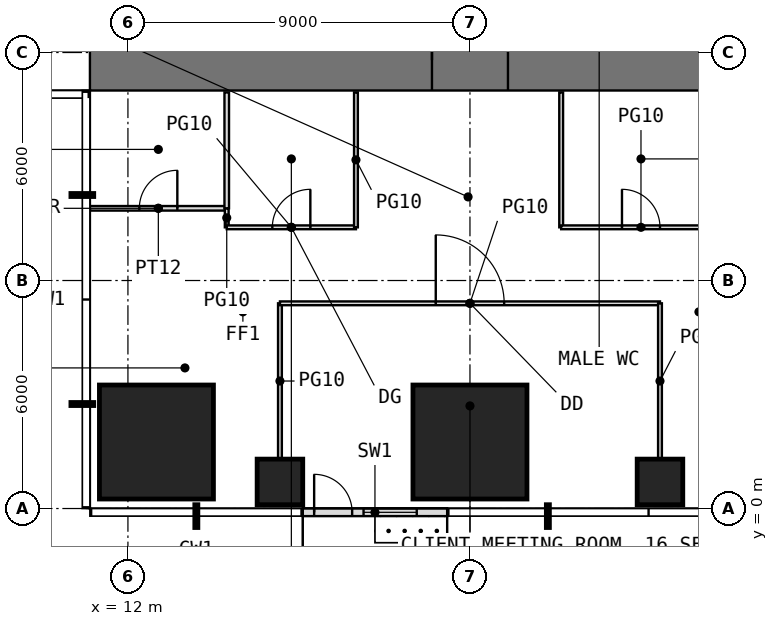
"""IFC4 building model, lengths in metres.
Left out: names, types, materials, properties, quantities, classifications, styles, units other than length and angle.
Written with IfcOpenShell. Run it as: python <this file> out.ifc"""

import sys

from ifc_helpers import new_model, si_unit, direction, frame, frame_2d, origin, origin_2d, place, context, subcontext, project, spatial, rectangle, extrude, element, fill, save


model = new_model("IFC4")
c1 = context("Model", 3, precision=1e-05, world=origin(), true_north=direction((0.0, 1.0)))
c2 = subcontext(c1, "Body", "Model", "MODEL_VIEW")
j1 = project(units=[si_unit("LENGTHUNIT", "METRE"), si_unit("PLANEANGLEUNIT", "RADIAN")], contexts=[c1])
p1 = place(None, origin())
s1 = spatial("IfcSite", under=j1, at=p1, CompositionType="ELEMENT")
p2 = place(p1, origin())
s2 = spatial("IfcBuilding", under=s1, at=p2, CompositionType="ELEMENT")
p3 = place(p2, frame((0.0, 0.0, 100.5)))
s3 = spatial("IfcBuildingStorey", under=s2, at=p3, CompositionType="ELEMENT", Elevation=100.5)
p4 = place(p3, frame((12.75, 1.75, 0.0), z_axis=(0.0, 0.0, 1.0), x_axis=(1.0, 0.0, 0.0)))
e1 = element("IfcColumn", 1, at=p4, inside=s3, PredefinedType="COLUMN", context=c2, shape_type="SweptSolid", body=[
    extrude(rectangle(XDim=3.0, YDim=3.0, at=origin_2d()), origin(), (0.0, 0.0, 1.0), 4.0),
])
p5 = place(p3, frame((16.0, 0.7, 0.0), z_axis=(0.0, 0.0, 1.0), x_axis=(1.0, 0.0, 0.0)))
e2 = element("IfcColumn", 2, at=p5, inside=s3, PredefinedType="COLUMN", context=c2, shape_type="SweptSolid", body=[
    extrude(rectangle(XDim=1.2, YDim=1.2, at=origin_2d()), origin(), (0.0, 0.0, 1.0), 4.0),
])
p6 = place(p3, frame((21.0, 1.75, 0.0), z_axis=(0.0, 0.0, 1.0), x_axis=(1.0, 0.0, 0.0)))
e3 = element("IfcColumn", 3, at=p6, inside=s3, PredefinedType="COLUMN", context=c2, shape_type="SweptSolid", body=[
    extrude(rectangle(XDim=3.0, YDim=3.0, at=origin_2d()), origin(), (0.0, 0.0, 1.0), 4.0),
])
p7 = place(p3, frame((26.0, 0.7, 0.0), z_axis=(0.0, 0.0, 1.0), x_axis=(1.0, 0.0, 0.0)))
e4 = element("IfcColumn", 4, at=p7, inside=s3, PredefinedType="COLUMN", context=c2, shape_type="SweptSolid", body=[
    extrude(rectangle(XDim=1.2, YDim=1.2, at=origin_2d()), origin(), (0.0, 0.0, 1.0), 4.0),
])
p8 = place(p3, frame((16.6, -0.1, 0.0), z_axis=(0.0, 0.0, 1.0), x_axis=(1.0, 0.0, 0.0)))
e5 = element("IfcWall", 5, at=p8, inside=s3, PredefinedType="USERDEFINED", context=c2, shape_type="SweptSolid", body=[
    extrude(rectangle(XDim=3.8, YDim=0.2, at=frame_2d((1.9, 0.0))), origin(), (0.0, 0.0, 1.0), 3.75),
])
p9 = place(p8, frame((0.3, 0.0, 0.0)))
e6 = element("IfcOpeningElement", 6, at=p9, cuts=e5, PredefinedType="OPENING", context=c2, shape_type="SweptSolid", body=[
    extrude(rectangle(XDim=1.0, YDim=2.4, at=frame_2d((0.5, 1.2))), frame((0.0, 0.11, 0.0), z_axis=(0.0, -1.0, 0.0), x_axis=(1.0, 0.0, 0.0)), (0.0, 0.0, 1.0), 0.22),
])
p10 = place(p8, frame((1.6, 0.0, 0.3)))
e7 = element("IfcOpeningElement", 7, at=p10, cuts=e5, PredefinedType="OPENING", context=c2, shape_type="SweptSolid", body=[
    extrude(rectangle(XDim=1.4, YDim=2.7, at=frame_2d((0.7, 1.35))), frame((0.0, 0.11, 0.0), z_axis=(0.0, -1.0, 0.0), x_axis=(1.0, 0.0, 0.0)), (0.0, 0.0, 1.0), 0.22),
])
p11 = place(p3, frame((11.0, 11.8, -0.05), z_axis=(0.0, 0.0, 1.0), x_axis=(1.0, 0.0, 0.0)))
e8 = element("IfcWall", 8, at=p11, inside=s3, PredefinedType="SHEAR", context=c2, shape_type="SweptSolid", body=[
    extrude(rectangle(XDim=20.0, YDim=1.6, at=frame_2d((10.0, 0.0))), origin(), (0.0, 0.0, 1.0), 4.0),
])
p12 = place(p11, frame((9.0, 0.0, 0.05)))
e9 = element("IfcOpeningElement", 9, at=p12, cuts=e8, PredefinedType="OPENING", context=c2, shape_type="SweptSolid", body=[
    extrude(rectangle(XDim=2.0, YDim=2.2, at=frame_2d((1.0, 1.1))), frame((0.0, 0.81, 0.0), z_axis=(0.0, -1.0, 0.0), x_axis=(1.0, 0.0, 0.0)), (0.0, 0.0, 1.0), 1.62),
])
p13 = place(p3, frame((11.0, 7.9, 0.0), z_axis=(0.0, 0.0, 1.0), x_axis=(1.0, 0.0, 0.0)))
e10 = element("IfcWall", 10, at=p13, inside=s3, PredefinedType="PARTITIONING", context=c2, shape_type="SweptSolid", body=[
    extrude(rectangle(XDim=3.6, YDim=0.12, at=frame_2d((1.8, 0.0))), origin(), (0.0, 0.0, 1.0), 3.75),
])
p14 = place(p13, frame((1.3, 0.0, 0.0)))
e11 = element("IfcOpeningElement", 11, at=p14, cuts=e10, PredefinedType="OPENING", context=c2, shape_type="SweptSolid", body=[
    extrude(rectangle(XDim=1.0, YDim=2.2, at=frame_2d((0.5, 1.1))), frame((0.0, 0.07, 0.0), z_axis=(0.0, -1.0, 0.0), x_axis=(1.0, 0.0, 0.0)), (0.0, 0.0, 1.0), 0.14),
])
p15 = place(p3, frame((14.6, 7.4, 0.0), z_axis=(0.0, 0.0, 1.0), x_axis=(0.0, 1.0, 0.0)))
e12 = element("IfcWall", 12, at=p15, inside=s3, PredefinedType="PARTITIONING", context=c2, shape_type="SweptSolid", body=[
    extrude(rectangle(XDim=0.5, YDim=0.1, at=frame_2d((0.25, 0.0))), origin(), (0.0, 0.0, 1.0), 3.75),
])
p16 = place(p3, frame((14.6, 7.4, 0.0), z_axis=(0.0, 0.0, 1.0), x_axis=(1.0, 0.0, 0.0)))
e13 = element("IfcWall", 13, at=p16, inside=s3, PredefinedType="PARTITIONING", context=c2, shape_type="SweptSolid", body=[
    extrude(rectangle(XDim=3.4, YDim=0.1, at=frame_2d((1.7, 0.0))), origin(), (0.0, 0.0, 1.0), 3.75),
])
p17 = place(p16, frame((1.2, 0.0, 0.0)))
e14 = element("IfcOpeningElement", 14, at=p17, cuts=e13, PredefinedType="OPENING", context=c2, shape_type="SweptSolid", body=[
    extrude(rectangle(XDim=1.0, YDim=2.4, at=frame_2d((0.5, 1.2))), frame((0.0, 0.06, 0.0), z_axis=(0.0, -1.0, 0.0), x_axis=(1.0, 0.0, 0.0)), (0.0, 0.0, 1.0), 0.12),
])
p18 = place(p3, frame((14.6, 7.9, 0.0), z_axis=(0.0, 0.0, 1.0), x_axis=(0.0, 1.0, 0.0)))
e15 = element("IfcWall", 15, at=p18, inside=s3, PredefinedType="PARTITIONING", context=c2, shape_type="SweptSolid", body=[
    extrude(rectangle(XDim=3.05, YDim=0.12, at=frame_2d((1.525, 0.0))), origin(), (0.0, 0.0, 1.0), 3.75),
])
p19 = place(p3, frame((16.0, 1.31, 0.0), z_axis=(0.0, 0.0, 1.0), x_axis=(0.0, 1.0, 0.0)))
e16 = element("IfcWall", 16, at=p19, inside=s3, PredefinedType="PARTITIONING", context=c2, shape_type="SweptSolid", body=[
    extrude(rectangle(XDim=4.09, YDim=0.1, at=frame_2d((2.045, 0.0))), origin(), (0.0, 0.0, 1.0), 3.75),
])
p20 = place(p3, frame((16.0, 5.4, 0.0), z_axis=(0.0, 0.0, 1.0), x_axis=(1.0, 0.0, 0.0)))
e17 = element("IfcWall", 17, at=p20, inside=s3, PredefinedType="PARTITIONING", context=c2, shape_type="SweptSolid", body=[
    extrude(rectangle(XDim=10.0, YDim=0.1, at=frame_2d((5.0, 0.0))), origin(), (0.0, 0.0, 1.0), 3.75),
])
p21 = place(p20, frame((4.1, 0.0, 0.0)))
e18 = element("IfcOpeningElement", 18, at=p21, cuts=e17, PredefinedType="OPENING", context=c2, shape_type="SweptSolid", body=[
    extrude(rectangle(XDim=1.8, YDim=2.4, at=frame_2d((0.9, 1.2))), frame((0.0, 0.06, 0.0), z_axis=(0.0, -1.0, 0.0), x_axis=(1.0, 0.0, 0.0)), (0.0, 0.0, 1.0), 0.12),
])
for number, where, z_axis, x_axis in (
    (19, (18.0, 7.4, 0.0), (0.0, 0.0, 1.0), (0.0, 1.0, 0.0)),
    (20, (23.4, 7.4, 0.0), (0.0, 0.0, 1.0), (0.0, 1.0, 0.0)),
):
    element("IfcWall", number, at=place(p3, frame(where, z_axis=z_axis, x_axis=x_axis)), inside=s3, PredefinedType="PARTITIONING", context=c2, shape_type="SweptSolid", body=[
        extrude(rectangle(XDim=3.55, YDim=0.1, at=frame_2d((1.775, 0.0))), origin(), (0.0, 0.0, 1.0), 3.75),
    ])
p22 = place(p3, frame((23.4, 7.4, 0.0), z_axis=(0.0, 0.0, 1.0), x_axis=(1.0, 0.0, 0.0)))
e21 = element("IfcWall", 21, at=p22, inside=s3, PredefinedType="PARTITIONING", context=c2, shape_type="SweptSolid", body=[
    extrude(rectangle(XDim=4.2, YDim=0.1, at=frame_2d((2.1, 0.0))), origin(), (0.0, 0.0, 1.0), 3.75),
])
p23 = place(p22, frame((1.6, 0.0, 0.0)))
e22 = element("IfcOpeningElement", 22, at=p23, cuts=e21, PredefinedType="OPENING", context=c2, shape_type="SweptSolid", body=[
    extrude(rectangle(XDim=1.0, YDim=2.4, at=frame_2d((0.5, 1.2))), frame((0.0, 0.06, 0.0), z_axis=(0.0, -1.0, 0.0), x_axis=(1.0, 0.0, 0.0)), (0.0, 0.0, 1.0), 0.12),
])
p24 = place(p3, frame((26.0, 1.31, 0.0), z_axis=(0.0, 0.0, 1.0), x_axis=(0.0, 1.0, 0.0)))
e23 = element("IfcWall", 23, at=p24, inside=s3, PredefinedType="PARTITIONING", context=c2, shape_type="SweptSolid", body=[
    extrude(rectangle(XDim=4.09, YDim=0.1, at=frame_2d((2.045, 0.0))), origin(), (0.0, 0.0, 1.0), 3.75),
])
p25 = place(p9, origin())
e24 = element("IfcDoor", 24, at=p25, inside=s3, OperationType="SINGLE_SWING_LEFT", PredefinedType="DOOR", context=c2, shape_type="SweptSolid", body=[
    extrude(rectangle(XDim=1.0, YDim=2.4, at=frame_2d((0.5, 1.2))), frame((0.0, 0.025, 0.0), z_axis=(0.0, -1.0, 0.0), x_axis=(1.0, 0.0, 0.0)), (0.0, 0.0, 1.0), 0.05),
])
fill(e6, e24)
p26 = place(p10, origin())
e25 = element("IfcWindow", 25, at=p26, inside=s3, PartitioningType="SINGLE_PANEL", PredefinedType="WINDOW", context=c2, shape_type="SweptSolid", body=[
    extrude(rectangle(XDim=1.4, YDim=2.7, at=frame_2d((0.7, 1.35))), frame((0.0, 0.03, 0.0), z_axis=(0.0, -1.0, 0.0), x_axis=(1.0, 0.0, 0.0)), (0.0, 0.0, 1.0), 0.06),
])
fill(e7, e25)
p27 = place(p12, origin())
e26 = element("IfcDoor", 26, at=p27, inside=s3, OperationType="DOUBLE_DOOR_SINGLE_SWING", PredefinedType="DOOR", context=c2, shape_type="SweptSolid", body=[
    extrude(rectangle(XDim=2.0, YDim=2.2, at=frame_2d((1.0, 1.1))), frame((0.0, 0.025, 0.0), z_axis=(0.0, -1.0, 0.0), x_axis=(1.0, 0.0, 0.0)), (0.0, 0.0, 1.0), 0.05),
])
fill(e9, e26)
p28 = place(p14, origin())
e27 = element("IfcDoor", 27, at=p28, inside=s3, OperationType="SINGLE_SWING_RIGHT", PredefinedType="DOOR", context=c2, shape_type="SweptSolid", body=[
    extrude(rectangle(XDim=1.0, YDim=2.2, at=frame_2d((0.5, 1.1))), frame((0.0, 0.025, 0.0), z_axis=(0.0, -1.0, 0.0), x_axis=(1.0, 0.0, 0.0)), (0.0, 0.0, 1.0), 0.05),
])
fill(e11, e27)
p29 = place(p17, origin())
e28 = element("IfcDoor", 28, at=p29, inside=s3, OperationType="SINGLE_SWING_RIGHT", PredefinedType="DOOR", context=c2, shape_type="SweptSolid", body=[
    extrude(rectangle(XDim=1.0, YDim=2.4, at=frame_2d((0.5, 1.2))), frame((0.0, 0.025, 0.0), z_axis=(0.0, -1.0, 0.0), x_axis=(1.0, 0.0, 0.0)), (0.0, 0.0, 1.0), 0.05),
])
fill(e14, e28)
p30 = place(p23, origin())
e29 = element("IfcDoor", 29, at=p30, inside=s3, OperationType="SINGLE_SWING_LEFT", PredefinedType="DOOR", context=c2, shape_type="SweptSolid", body=[
    extrude(rectangle(XDim=1.0, YDim=2.4, at=frame_2d((0.5, 1.2))), frame((0.0, 0.025, 0.0), z_axis=(0.0, -1.0, 0.0), x_axis=(1.0, 0.0, 0.0)), (0.0, 0.0, 1.0), 0.05),
])
fill(e22, e29)
p31 = place(p21, origin())
e30 = element("IfcDoor", 30, at=p31, inside=s3, OperationType="DOUBLE_DOOR_SINGLE_SWING", PredefinedType="DOOR", context=c2, shape_type="SweptSolid", body=[
    extrude(rectangle(XDim=1.8, YDim=2.4, at=frame_2d((0.9, 1.2))), frame((0.0, 0.025, 0.0), z_axis=(0.0, -1.0, 0.0), x_axis=(1.0, 0.0, 0.0)), (0.0, 0.0, 1.0), 0.05),
])
fill(e18, e30)
save(model, sys.argv[1])
